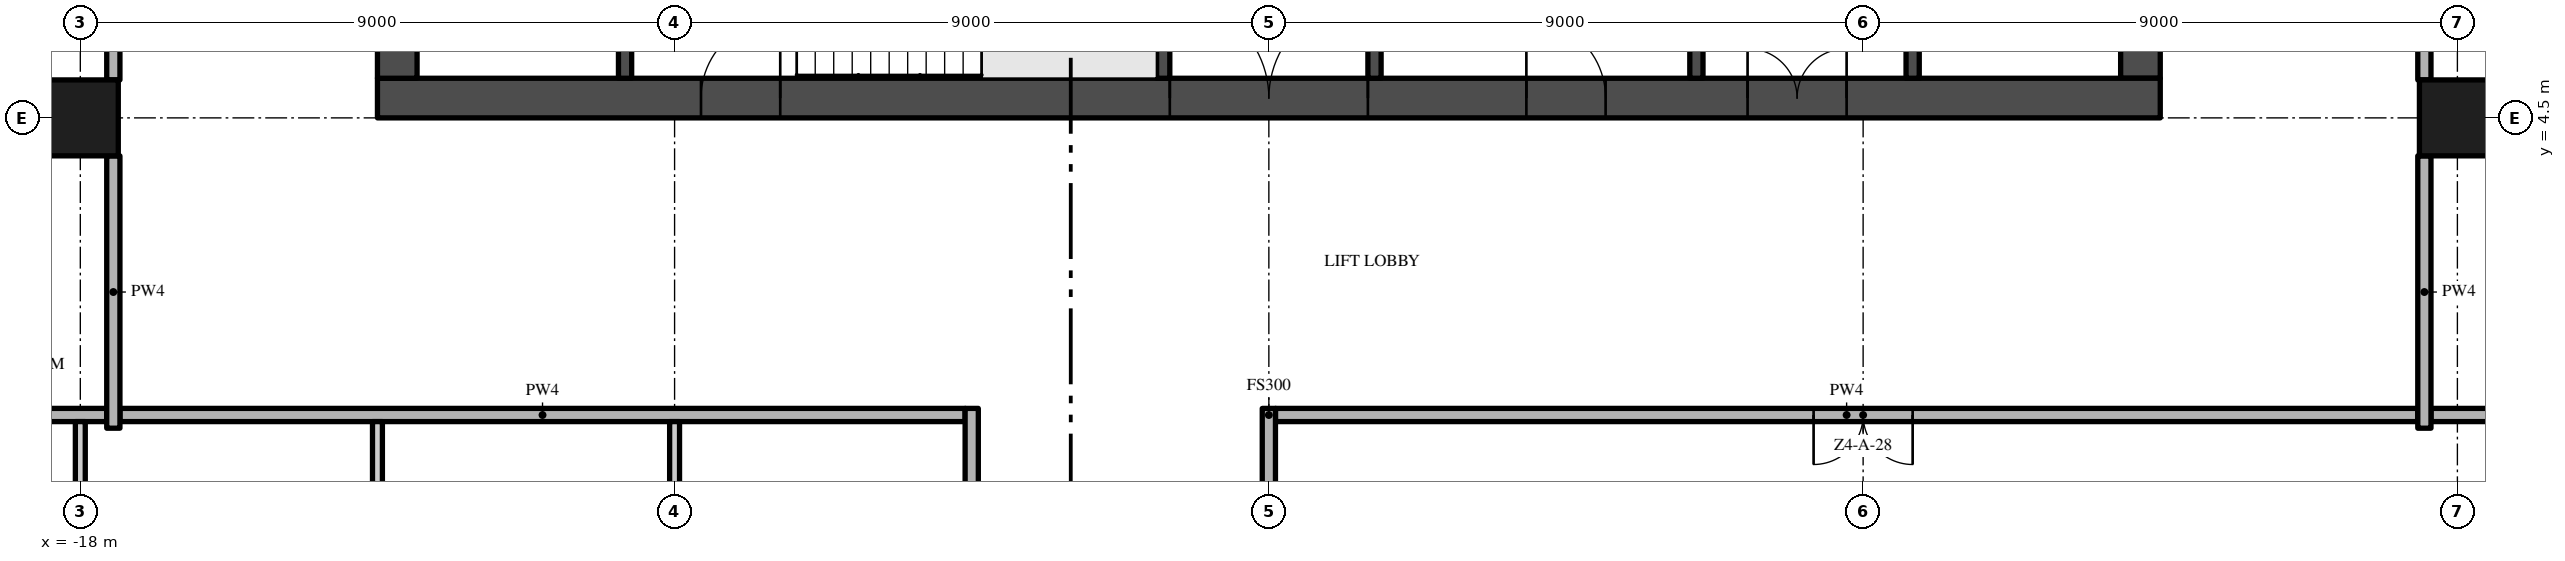
"""IFC4 building model, lengths in metres.
Left out: names, types, materials, properties, quantities, classifications, styles, units other than length and angle.
Written with IfcOpenShell. Run it as: python <this file> out.ifc"""

import sys

from ifc_helpers import new_model, si_unit, direction, frame, frame_2d, origin, origin_2d, place, context, subcontext, project, spatial, rectangle, extrude, element, fill, save


model = new_model("IFC4")
c1 = context("Model", 3, precision=1e-05, world=origin(), true_north=direction((0.0, 1.0)))
c2 = subcontext(c1, "Body", "Model", "MODEL_VIEW")
j1 = project(units=[si_unit("LENGTHUNIT", "METRE"), si_unit("PLANEANGLEUNIT", "RADIAN")], contexts=[c1])
p1 = place(None, origin())
s1 = spatial("IfcSite", under=j1, at=p1, CompositionType="ELEMENT")
p2 = place(p1, origin())
s2 = spatial("IfcBuilding", under=s1, at=p2, CompositionType="ELEMENT")
p3 = place(p2, frame((0.0, 0.0, 192.0)))
s3 = spatial("IfcBuildingStorey", under=s2, at=p3, CompositionType="ELEMENT", Elevation=192.0)
p4 = place(p3, frame((-13.5, 4.8, -0.3), z_axis=(0.0, 0.0, 1.0), x_axis=(1.0, 0.0, 0.0)))
e1 = element("IfcWall", 1, at=p4, inside=s3, PredefinedType="SHEAR", context=c2, shape_type="SweptSolid", body=[
    extrude(rectangle(XDim=27.0, YDim=0.6, at=frame_2d((13.5, 0.0))), origin(), (0.0, 0.0, 1.0), 3.8),
])
p5 = place(p4, frame((12.0, 0.0, 0.3)))
e2 = element("IfcOpeningElement", 2, at=p5, cuts=e1, PredefinedType="OPENING", context=c2, shape_type="SweptSolid", body=[
    extrude(rectangle(XDim=3.0, YDim=2.4, at=frame_2d((1.5, 1.2))), frame((0.0, 0.31, 0.0), z_axis=(0.0, -1.0, 0.0), x_axis=(1.0, 0.0, 0.0)), (0.0, 0.0, 1.0), 0.62),
])
p6 = place(p4, frame((4.9, 0.0, 0.3)))
e3 = element("IfcOpeningElement", 3, at=p6, cuts=e1, PredefinedType="OPENING", context=c2, shape_type="SweptSolid", body=[
    extrude(rectangle(XDim=1.2, YDim=2.2, at=frame_2d((0.6, 1.1))), frame((0.0, 0.31, 0.0), z_axis=(0.0, -1.0, 0.0), x_axis=(1.0, 0.0, 0.0)), (0.0, 0.0, 1.0), 0.62),
])
p7 = place(p4, frame((20.75, 0.0, 0.3)))
e4 = element("IfcOpeningElement", 4, at=p7, cuts=e1, PredefinedType="OPENING", context=c2, shape_type="SweptSolid", body=[
    extrude(rectangle(XDim=1.5, YDim=2.2, at=frame_2d((0.75, 1.1))), frame((0.0, 0.31, 0.0), z_axis=(0.0, -1.0, 0.0), x_axis=(1.0, 0.0, 0.0)), (0.0, 0.0, 1.0), 0.62),
])
p8 = place(p4, frame((17.4, 0.0, 0.3)))
e5 = element("IfcOpeningElement", 5, at=p8, cuts=e1, PredefinedType="OPENING", context=c2, shape_type="SweptSolid", body=[
    extrude(rectangle(XDim=1.2, YDim=2.2, at=frame_2d((0.6, 1.1))), frame((0.0, 0.31, 0.0), z_axis=(0.0, -1.0, 0.0), x_axis=(1.0, 0.0, 0.0)), (0.0, 0.0, 1.0), 0.62),
])
p9 = place(p3, frame((13.2, 5.1, -0.3), z_axis=(0.0, 0.0, 1.0), x_axis=(0.0, 1.0, 0.0)))
e6 = element("IfcWall", 6, at=p9, inside=s3, PredefinedType="SHEAR", context=c2, shape_type="SweptSolid", body=[
    extrude(rectangle(XDim=16.8, YDim=0.6, at=frame_2d((8.4, 0.0))), origin(), (0.0, 0.0, 1.0), 3.8),
])
p10 = place(p9, frame((6.3, 0.0, 0.3)))
e7 = element("IfcOpeningElement", 7, at=p10, cuts=e6, PredefinedType="OPENING", context=c2, shape_type="SweptSolid", body=[
    extrude(rectangle(XDim=1.2, YDim=2.2, at=frame_2d((0.6, 1.1))), frame((0.0, 0.31, 0.0), z_axis=(0.0, -1.0, 0.0), x_axis=(1.0, 0.0, 0.0)), (0.0, 0.0, 1.0), 0.62),
])
p11 = place(p3, frame((-13.2, 21.9, -0.3), z_axis=(0.0, 0.0, 1.0), x_axis=(0.0, -1.0, 0.0)))
e8 = element("IfcWall", 8, at=p11, inside=s3, PredefinedType="SHEAR", context=c2, shape_type="SweptSolid", body=[
    extrude(rectangle(XDim=16.8, YDim=0.6, at=frame_2d((8.4, 0.0))), origin(), (0.0, 0.0, 1.0), 3.8),
])
p12 = place(p11, frame((9.3, 0.0, 0.3)))
e9 = element("IfcOpeningElement", 9, at=p12, cuts=e8, PredefinedType="OPENING", context=c2, shape_type="SweptSolid", body=[
    extrude(rectangle(XDim=1.2, YDim=2.2, at=frame_2d((0.6, 1.1))), frame((0.0, 0.31, 0.0), z_axis=(0.0, -1.0, 0.0), x_axis=(1.0, 0.0, 0.0)), (0.0, 0.0, 1.0), 0.62),
])
for number, where, z_axis, x_axis in (
    (10, (-18.0, 4.5, 0.0), (0.0, 0.0, 1.0), (1.0, 0.0, 0.0)),
    (11, (18.0, 4.5, 0.0), (0.0, 0.0, 1.0), (1.0, 0.0, 0.0)),
):
    element("IfcColumn", number, at=place(p3, frame(where, z_axis=z_axis, x_axis=x_axis)), inside=s3, PredefinedType="COLUMN", context=c2, shape_type="SweptSolid", body=[
        extrude(rectangle(XDim=1.15, YDim=1.15, at=origin_2d()), origin(), (0.0, 0.0, 1.0), 3.5),
    ])
for number, where, z_axis, x_axis in (
    (12, (-9.75, 5.1, 0.0), (0.0, 0.0, 1.0), (0.0, 1.0, 0.0)),
    (13, (-1.6, 5.1, 0.0), (0.0, 0.0, 1.0), (0.0, 1.0, 0.0)),
):
    element("IfcWall", number, at=place(p3, frame(where, z_axis=z_axis, x_axis=x_axis)), inside=s3, PredefinedType="SHEAR", context=c2, shape_type="SweptSolid", body=[
        extrude(rectangle(XDim=2.85, YDim=0.2, at=frame_2d((1.425, 0.0))), origin(), (0.0, 0.0, 1.0), 3.5),
    ])
p13 = place(p3, frame((1.6, 11.5, 0.0), z_axis=(0.0, 0.0, 1.0), x_axis=(0.0, -1.0, 0.0)))
e14 = element("IfcWall", 14, at=p13, inside=s3, PredefinedType="SHEAR", context=c2, shape_type="SweptSolid", body=[
    extrude(rectangle(XDim=6.4, YDim=0.2, at=frame_2d((3.2, 0.0))), origin(), (0.0, 0.0, 1.0), 3.5),
])
p14 = place(p13, frame((2.35, 0.0, 0.0)))
e15 = element("IfcOpeningElement", 15, at=p14, cuts=e14, PredefinedType="OPENING", context=c2, shape_type="SweptSolid", body=[
    extrude(rectangle(XDim=0.9, YDim=2.1, at=frame_2d((0.45, 1.05))), frame((0.0, 0.11, 0.0), z_axis=(0.0, -1.0, 0.0), x_axis=(1.0, 0.0, 0.0)), (0.0, 0.0, 1.0), 0.22),
])
p15 = place(p3, frame((6.475, 5.1, 0.0), z_axis=(0.0, 0.0, 1.0), x_axis=(0.0, 1.0, 0.0)))
e16 = element("IfcWall", 16, at=p15, inside=s3, PredefinedType="SHEAR", context=c2, shape_type="SweptSolid", body=[
    extrude(rectangle(XDim=6.4, YDim=0.2, at=frame_2d((3.2, 0.0))), origin(), (0.0, 0.0, 1.0), 3.5),
])
p16 = place(p3, frame((9.75, 5.1, 0.0), z_axis=(0.0, 0.0, 1.0), x_axis=(0.0, 1.0, 0.0)))
e17 = element("IfcWall", 17, at=p16, inside=s3, PredefinedType="SHEAR", context=c2, shape_type="SweptSolid", body=[
    extrude(rectangle(XDim=2.5, YDim=0.2, at=frame_2d((1.25, 0.0))), origin(), (0.0, 0.0, 1.0), 3.5),
])
p17 = place(p16, frame((0.85, 0.0, 0.0)))
e18 = element("IfcOpeningElement", 18, at=p17, cuts=e17, PredefinedType="OPENING", context=c2, shape_type="SweptSolid", body=[
    extrude(rectangle(XDim=1.1, YDim=2.1, at=frame_2d((0.55, 1.05))), frame((0.0, 0.11, 0.0), z_axis=(0.0, -1.0, 0.0), x_axis=(1.0, 0.0, 0.0)), (0.0, 0.0, 1.0), 0.22),
])
p18 = place(p3, frame((-17.4, 0.0, 0.0), z_axis=(0.0, 0.0, 1.0), x_axis=(1.0, 0.0, 0.0)))
e19 = element("IfcWall", 19, at=p18, inside=s3, PredefinedType="PARTITIONING", context=c2, shape_type="SweptSolid", body=[
    extrude(rectangle(XDim=12.8, YDim=0.2, at=frame_2d((6.4, 0.0))), origin(), (0.0, 0.0, 1.0), 3.5),
])
p19 = place(p3, frame((17.4, 0.0, 0.0), z_axis=(0.0, 0.0, 1.0), x_axis=(-1.0, 0.0, 0.0)))
e20 = element("IfcWall", 20, at=p19, inside=s3, PredefinedType="PARTITIONING", context=c2, shape_type="SweptSolid", body=[
    extrude(rectangle(XDim=17.3, YDim=0.2, at=frame_2d((8.65, 0.0))), origin(), (0.0, 0.0, 1.0), 3.5),
])
p20 = place(p19, frame((7.65, 0.0, 0.0)))
e21 = element("IfcOpeningElement", 21, at=p20, cuts=e20, PredefinedType="OPENING", context=c2, shape_type="SweptSolid", body=[
    extrude(rectangle(XDim=1.5, YDim=2.4, at=frame_2d((0.75, 1.2))), frame((0.0, 0.11, 0.0), z_axis=(0.0, -1.0, 0.0), x_axis=(1.0, 0.0, 0.0)), (0.0, 0.0, 1.0), 0.22),
])
for number, where, z_axis, x_axis in (
    (22, (-26.7, 0.0, 0.0), (0.0, 0.0, 1.0), (1.0, 0.0, 0.0)),
    (23, (17.6, 0.0, 0.0), (0.0, 0.0, 1.0), (1.0, 0.0, 0.0)),
):
    element("IfcWall", number, at=place(p3, frame(where, z_axis=z_axis, x_axis=x_axis)), inside=s3, PredefinedType="PARTITIONING", context=c2, shape_type="SweptSolid", body=[
        extrude(rectangle(XDim=9.1, YDim=0.2, at=frame_2d((4.55, 0.0))), origin(), (0.0, 0.0, 1.0), 3.5),
    ])
p21 = place(p3, frame((-18.0, -3.925, 0.0), z_axis=(0.0, 0.0, 1.0), x_axis=(0.0, 1.0, 0.0)))
e24 = element("IfcWall", 24, at=p21, inside=s3, PredefinedType="PARTITIONING", context=c2, shape_type="SweptSolid", body=[
    extrude(rectangle(XDim=3.825, YDim=0.15, at=frame_2d((1.913, 0.0))), origin(), (0.0, 0.0, 1.0), 3.5),
])
p22 = place(p21, frame((0.15, 0.0, 0.0)))
e25 = element("IfcOpeningElement", 25, at=p22, cuts=e24, PredefinedType="OPENING", context=c2, shape_type="SweptSolid", body=[
    extrude(rectangle(XDim=1.0, YDim=2.4, at=frame_2d((0.5, 1.2))), frame((0.0, 0.085, 0.0), z_axis=(0.0, -1.0, 0.0), x_axis=(1.0, 0.0, 0.0)), (0.0, 0.0, 1.0), 0.17),
])
p23 = place(p3, frame((-17.5, -0.2, 0.0), z_axis=(0.0, 0.0, 1.0), x_axis=(0.0, 1.0, 0.0)))
e26 = element("IfcWall", 26, at=p23, inside=s3, PredefinedType="PARTITIONING", context=c2, shape_type="SweptSolid", body=[
    extrude(rectangle(XDim=4.125, YDim=0.2, at=frame_2d((2.062, 0.0))), origin(), (0.0, 0.0, 1.0), 3.5),
])
p24 = place(p3, frame((-17.5, 5.075, 0.0), z_axis=(0.0, 0.0, 1.0), x_axis=(0.0, 1.0, 0.0)))
e27 = element("IfcWall", 27, at=p24, inside=s3, PredefinedType="PARTITIONING", context=c2, shape_type="SweptSolid", body=[
    extrude(rectangle(XDim=7.85, YDim=0.2, at=frame_2d((3.925, 0.0))), origin(), (0.0, 0.0, 1.0), 3.5),
])
p25 = place(p24, frame((1.05, 0.0, 0.0)))
e28 = element("IfcOpeningElement", 28, at=p25, cuts=e27, PredefinedType="OPENING", context=c2, shape_type="SweptSolid", body=[
    extrude(rectangle(XDim=1.2, YDim=2.4, at=frame_2d((0.6, 1.2))), frame((0.0, 0.11, 0.0), z_axis=(0.0, -1.0, 0.0), x_axis=(1.0, 0.0, 0.0)), (0.0, 0.0, 1.0), 0.22),
])
p26 = place(p3, frame((-13.5, -11.325, 0.0), z_axis=(0.0, 0.0, 1.0), x_axis=(0.0, 1.0, 0.0)))
e29 = element("IfcWall", 29, at=p26, inside=s3, PredefinedType="PARTITIONING", context=c2, shape_type="SweptSolid", body=[
    extrude(rectangle(XDim=11.225, YDim=0.15, at=frame_2d((5.612, 0.0))), origin(), (0.0, 0.0, 1.0), 3.5),
])
p27 = place(p3, frame((-9.0, -3.925, 0.0), z_axis=(0.0, 0.0, 1.0), x_axis=(0.0, 1.0, 0.0)))
e30 = element("IfcWall", 30, at=p27, inside=s3, PredefinedType="PARTITIONING", context=c2, shape_type="SweptSolid", body=[
    extrude(rectangle(XDim=3.825, YDim=0.15, at=frame_2d((1.913, 0.0))), origin(), (0.0, 0.0, 1.0), 3.5),
])
p28 = place(p27, frame((2.025, 0.0, 0.0)))
e31 = element("IfcOpeningElement", 31, at=p28, cuts=e30, PredefinedType="OPENING", context=c2, shape_type="SweptSolid", body=[
    extrude(rectangle(XDim=0.8, YDim=2.0, at=frame_2d((0.4, 1.0))), frame((0.0, 0.085, 0.0), z_axis=(0.0, -1.0, 0.0), x_axis=(1.0, 0.0, 0.0)), (0.0, 0.0, 1.0), 0.17),
])
p29 = place(p3, frame((-4.5, -22.2, 0.0), z_axis=(0.0, 0.0, 1.0), x_axis=(0.0, 1.0, 0.0)))
e32 = element("IfcWall", 32, at=p29, inside=s3, PredefinedType="PARTITIONING", context=c2, shape_type="SweptSolid", body=[
    extrude(rectangle(XDim=22.3, YDim=0.2, at=frame_2d((11.15, 0.0))), origin(), (0.0, 0.0, 1.0), 3.5),
])
p30 = place(p29, frame((10.2, 0.0, 0.0)))
e33 = element("IfcOpeningElement", 33, at=p30, cuts=e32, PredefinedType="OPENING", context=c2, shape_type="SweptSolid", body=[
    extrude(rectangle(XDim=1.5, YDim=2.4, at=frame_2d((0.75, 1.2))), frame((0.0, 0.11, 0.0), z_axis=(0.0, -1.0, 0.0), x_axis=(1.0, 0.0, 0.0)), (0.0, 0.0, 1.0), 0.22),
])
p31 = place(p3, frame((0.0, -3.925, 0.0), z_axis=(0.0, 0.0, 1.0), x_axis=(0.0, 1.0, 0.0)))
e34 = element("IfcWall", 34, at=p31, inside=s3, PredefinedType="PARTITIONING", context=c2, shape_type="SweptSolid", body=[
    extrude(rectangle(XDim=4.025, YDim=0.2, at=frame_2d((2.013, 0.0))), origin(), (0.0, 0.0, 1.0), 3.5),
])
p32 = place(p3, frame((17.5, -0.2, 0.0), z_axis=(0.0, 0.0, 1.0), x_axis=(0.0, 1.0, 0.0)))
e35 = element("IfcWall", 35, at=p32, inside=s3, PredefinedType="PARTITIONING", context=c2, shape_type="SweptSolid", body=[
    extrude(rectangle(XDim=4.125, YDim=0.2, at=frame_2d((2.062, 0.0))), origin(), (0.0, 0.0, 1.0), 3.5),
])
p33 = place(p3, frame((17.5, 5.075, 0.0), z_axis=(0.0, 0.0, 1.0), x_axis=(0.0, 1.0, 0.0)))
e36 = element("IfcWall", 36, at=p33, inside=s3, PredefinedType="PARTITIONING", context=c2, shape_type="SweptSolid", body=[
    extrude(rectangle(XDim=7.85, YDim=0.2, at=frame_2d((3.925, 0.0))), origin(), (0.0, 0.0, 1.0), 3.5),
])
p34 = place(p5, frame((3.0, 0.0, 0.0), z_axis=(0.0, 0.0, 1.0), x_axis=(-1.0, 0.0, 0.0)))
e37 = element("IfcDoor", 37, at=p34, inside=s3, OperationType="DOUBLE_DOOR_SINGLE_SWING", PredefinedType="DOOR", context=c2, shape_type="SweptSolid", body=[
    extrude(rectangle(XDim=3.0, YDim=2.4, at=frame_2d((1.5, 1.2))), frame((0.0, 0.025, 0.0), z_axis=(0.0, -1.0, 0.0), x_axis=(1.0, 0.0, 0.0)), (0.0, 0.0, 1.0), 0.05),
])
fill(e2, e37)
p35 = place(p6, frame((1.2, 0.0, 0.0), z_axis=(0.0, 0.0, 1.0), x_axis=(-1.0, 0.0, 0.0)))
e38 = element("IfcDoor", 38, at=p35, inside=s3, OperationType="SINGLE_SWING_LEFT", PredefinedType="DOOR", context=c2, shape_type="SweptSolid", body=[
    extrude(rectangle(XDim=1.2, YDim=2.2, at=frame_2d((0.6, 1.1))), frame((0.0, 0.025, 0.0), z_axis=(0.0, -1.0, 0.0), x_axis=(1.0, 0.0, 0.0)), (0.0, 0.0, 1.0), 0.05),
])
fill(e3, e38)
p36 = place(p7, frame((1.5, 0.0, 0.0), z_axis=(0.0, 0.0, 1.0), x_axis=(-1.0, 0.0, 0.0)))
e39 = element("IfcDoor", 39, at=p36, inside=s3, OperationType="DOUBLE_DOOR_SINGLE_SWING", PredefinedType="DOOR", context=c2, shape_type="SweptSolid", body=[
    extrude(rectangle(XDim=1.5, YDim=2.2, at=frame_2d((0.75, 1.1))), frame((0.0, 0.025, 0.0), z_axis=(0.0, -1.0, 0.0), x_axis=(1.0, 0.0, 0.0)), (0.0, 0.0, 1.0), 0.05),
])
fill(e4, e39)
p37 = place(p8, frame((1.2, 0.0, 0.0), z_axis=(0.0, 0.0, 1.0), x_axis=(-1.0, 0.0, 0.0)))
e40 = element("IfcDoor", 40, at=p37, inside=s3, OperationType="SINGLE_SWING_RIGHT", PredefinedType="DOOR", context=c2, shape_type="SweptSolid", body=[
    extrude(rectangle(XDim=1.2, YDim=2.2, at=frame_2d((0.6, 1.1))), frame((0.0, 0.025, 0.0), z_axis=(0.0, -1.0, 0.0), x_axis=(1.0, 0.0, 0.0)), (0.0, 0.0, 1.0), 0.05),
])
fill(e5, e40)
p38 = place(p20, origin())
e41 = element("IfcDoor", 41, at=p38, inside=s3, OperationType="DOUBLE_DOOR_SINGLE_SWING", PredefinedType="DOOR", context=c2, shape_type="SweptSolid", body=[
    extrude(rectangle(XDim=1.5, YDim=2.4, at=frame_2d((0.75, 1.2))), frame((0.0, 0.025, 0.0), z_axis=(0.0, -1.0, 0.0), x_axis=(1.0, 0.0, 0.0)), (0.0, 0.0, 1.0), 0.05),
])
fill(e21, e41)
save(model, sys.argv[1])
